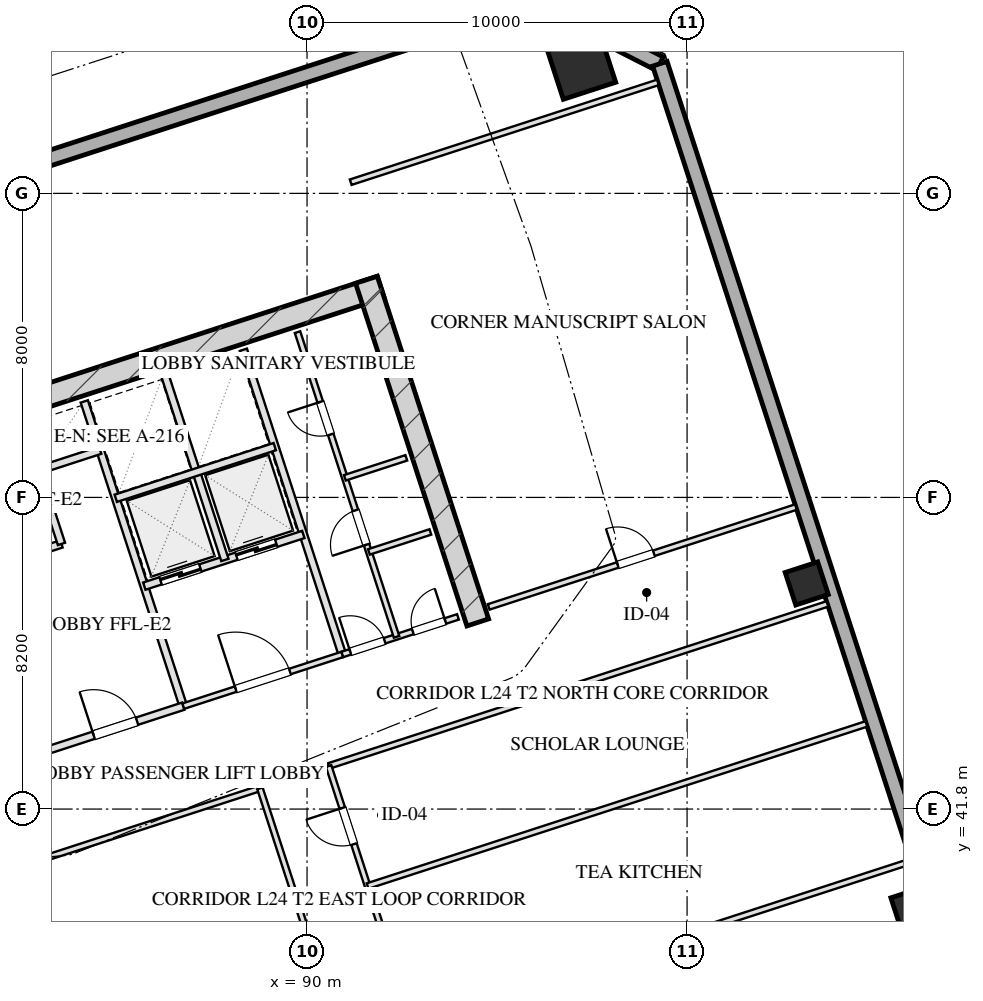
"""IFC4 building model, lengths in metres.
Left out: names, types, materials, properties, quantities, classifications, styles, units other than length and angle.
Written with IfcOpenShell. Run it as: python <this file> out.ifc"""

import sys

from ifc_helpers import new_model, si_unit, direction, frame, frame_2d, origin, origin_2d, place, context, subcontext, project, spatial, rectangle, hollow_rectangle, extrude, element, fill, save


model = new_model("IFC4")
c1 = context("Model", 3, precision=1e-05, world=origin(), true_north=direction((0.0, 1.0)))
c2 = subcontext(c1, "Body", "Model", "MODEL_VIEW")
j1 = project(units=[si_unit("LENGTHUNIT", "METRE"), si_unit("PLANEANGLEUNIT", "RADIAN")], contexts=[c1])
p1 = place(None, origin())
s1 = spatial("IfcSite", under=j1, at=p1, CompositionType="ELEMENT")
p2 = place(p1, origin())
s2 = spatial("IfcBuilding", under=s1, at=p2, CompositionType="ELEMENT")
p3 = place(p2, frame((0.0, 0.0, 96.6)))
s3 = spatial("IfcBuildingStorey", under=s2, at=p3, CompositionType="ELEMENT", Elevation=96.6)
p4 = place(p3, frame((76.344, 50.466, 0.0), z_axis=(0.0, 0.0, 1.0), x_axis=(0.951055727519, 0.309019421968, 0.0)))
e1 = element("IfcWall", 1, at=p4, inside=s3, PredefinedType="SHEAR", context=c2, shape_type="SweptSolid", body=[
    extrude(rectangle(XDim=16.4, YDim=0.6, at=frame_2d((8.2, 0.0))), origin(), (0.0, 0.0, 1.0), 3.45),
])
p5 = place(p3, frame((94.492, 46.71, 0.0), z_axis=(0.0, 0.0, 1.0), x_axis=(-0.309010370028, 0.95105866865, 0.0)))
e2 = element("IfcWall", 2, at=p5, inside=s3, PredefinedType="SHEAR", context=c2, shape_type="SweptSolid", body=[
    extrude(rectangle(XDim=9.48, YDim=0.6, at=frame_2d((4.74, 0.0))), origin(), (0.0, 0.0, 1.0), 3.45),
])
p6 = place(p3, frame((97.209, 61.388, 0.0), z_axis=(0.0, 0.0, 1.0), x_axis=(0.951056516295, 0.309016994375, 0.0)))
e3 = element("IfcColumn", 3, at=p6, inside=s3, PredefinedType="COLUMN", context=c2, shape_type="SweptSolid", body=[
    extrude(hollow_rectangle(XDim=1.45, YDim=1.45, WallThickness=0.05, at=origin_2d()), origin(), (0.0, 0.0, 1.0), 3.451),
])
for number, where, z_axis, x_axis in (
    (4, (105.93, 39.176, 0.0), (0.0, 0.0, 1.0), (0.951, 0.309, 0.0)),
    (5, (103.149, 47.736, 0.0), (0.0, 0.0, 1.0), (0.951, 0.309, 0.0)),
):
    element("IfcColumn", number, at=place(p3, frame(where, z_axis=z_axis, x_axis=x_axis)), inside=s3, PredefinedType="COLUMN", context=c2, shape_type="SweptSolid", body=[
        extrude(hollow_rectangle(XDim=0.9, YDim=0.9, WallThickness=0.032, at=origin_2d()), origin(), (0.0, 0.0, 1.0), 3.451),
    ])
p7 = place(p3, frame((68.047, 53.995, 0.0), z_axis=(0.0, 0.0, 1.0), x_axis=(0.95105505922, 0.309021478754, 0.0)))
e6 = element("IfcWall", 6, at=p7, inside=s3, PredefinedType="SOLIDWALL", context=c2, shape_type="SweptSolid", body=[
    extrude(rectangle(XDim=29.4, YDim=0.4, at=frame_2d((14.7, 0.0))), origin(), (0.0, 0.0, 1.0), 2.55),
])
p8 = place(p3, frame((96.008, 63.08, 0.0), z_axis=(0.0, 0.0, 1.0), x_axis=(0.891001999643, -0.45399937955, 0.0)))
e7 = element("IfcWall", 7, at=p8, inside=s3, PredefinedType="SOLIDWALL", context=c2, shape_type="SweptSolid", body=[
    extrude(rectangle(XDim=3.677, YDim=0.4, at=frame_2d((1.839, 0.0))), origin(), (0.0, 0.0, 1.0), 2.55),
])
p9 = place(p3, frame((99.284, 61.41, 0.0), z_axis=(0.0, 0.0, 1.0), x_axis=(0.309017542002, -0.95105633836, 0.0)))
e8 = element("IfcWall", 8, at=p9, inside=s3, PredefinedType="SOLIDWALL", context=c2, shape_type="SweptSolid", body=[
    extrude(rectangle(XDim=46.4, YDim=0.4, at=frame_2d((23.2, 0.0))), origin(), (0.0, 0.0, 1.0), 2.55),
])
p10 = place(p3, frame((86.743, 44.508, 0.0), z_axis=(0.0, 0.0, 1.0), x_axis=(-0.309016001439, 0.951056838919, 0.0)))
e9 = element("IfcWall", 9, at=p10, inside=s3, PredefinedType="PARTITIONING", context=c2, shape_type="SweptSolid", body=[
    extrude(rectangle(XDim=8.43, YDim=0.2, at=frame_2d((4.215, 0.0))), origin(), (0.0, 0.0, 1.0), 3.155),
])
p11 = place(p3, frame((83.101, 43.324, 0.0), z_axis=(0.0, 0.0, 1.0), x_axis=(0.951052804469, 0.309028417967, 0.0)))
e10 = element("IfcWall", 10, at=p11, inside=s3, PredefinedType="PARTITIONING", context=c2, shape_type="SweptSolid", body=[
    extrude(rectangle(XDim=3.83, YDim=0.2, at=frame_2d((1.915, 0.0))), origin(), (0.0, 0.0, 1.0), 3.155),
])
p12 = place(p11, frame((1.35, 0.0, 0.0)))
e11 = element("IfcOpeningElement", 11, at=p12, cuts=e10, PredefinedType="OPENING", context=c2, shape_type="SweptSolid", body=[
    extrude(rectangle(XDim=1.2, YDim=2.05, at=frame_2d((0.6, 1.025))), frame((0.0, 0.11, 0.0), z_axis=(0.0, -1.0, 0.0), x_axis=(1.0, 0.0, 0.0)), (0.0, 0.0, 1.0), 0.22),
])
p13 = place(p3, frame((81.54, 48.127, 0.0), z_axis=(0.0, 0.0, 1.0), x_axis=(0.951062257173, 0.308999325213, 0.0)))
e12 = element("IfcWall", 12, at=p13, inside=s3, PredefinedType="PARTITIONING", context=c2, shape_type="SweptSolid", body=[
    extrude(rectangle(XDim=2.1, YDim=0.2, at=frame_2d((1.05, 0.0))), origin(), (0.0, 0.0, 1.0), 3.155),
])
p14 = place(p13, frame((0.35, 0.0, 0.0)))
e13 = element("IfcOpeningElement", 13, at=p14, cuts=e12, PredefinedType="OPENING", context=c2, shape_type="SweptSolid", body=[
    extrude(rectangle(XDim=1.1, YDim=2.05, at=frame_2d((0.55, 1.025))), frame((0.0, 0.11, 0.0), z_axis=(0.0, -1.0, 0.0), x_axis=(1.0, 0.0, 0.0)), (0.0, 0.0, 1.0), 0.22),
])
p15 = place(p3, frame((83.538, 48.776, 0.0), z_axis=(0.0, 0.0, 1.0), x_axis=(-0.3089935693, 0.951064127245, 0.0)))
e14 = element("IfcWall", 14, at=p15, inside=s3, PredefinedType="PARTITIONING", context=c2, shape_type="SweptSolid", body=[
    extrude(rectangle(XDim=3.7, YDim=0.2, at=frame_2d((1.85, 0.0))), origin(), (0.0, 0.0, 1.0), 3.155),
])
p16 = place(p3, frame((82.91, 50.707, 0.0), z_axis=(0.0, 0.0, 1.0), x_axis=(0.951041328149, 0.309063734775, 0.0)))
e15 = element("IfcWall", 15, at=p16, inside=s3, PredefinedType="PARTITIONING", context=c2, shape_type="SweptSolid", body=[
    extrude(rectangle(XDim=1.73, YDim=0.2, at=frame_2d((0.865, 0.0))), origin(), (0.0, 0.0, 1.0), 3.155),
])
p17 = place(p3, frame((90.928, 45.868, 0.0), z_axis=(0.0, 0.0, 1.0), x_axis=(-0.309042196757, 0.951048327176, 0.0)))
e16 = element("IfcWall", 16, at=p17, inside=s3, PredefinedType="PARTITIONING", context=c2, shape_type="SweptSolid", body=[
    extrude(rectangle(XDim=8.43, YDim=0.2, at=frame_2d((4.215, 0.0))), origin(), (0.0, 0.0, 1.0), 3.155),
])
p18 = place(p3, frame((86.743, 44.508, 0.0), z_axis=(0.0, 0.0, 1.0), x_axis=(0.951063829732, 0.308994485023, 0.0)))
e17 = element("IfcWall", 17, at=p18, inside=s3, PredefinedType="PARTITIONING", context=c2, shape_type="SweptSolid", body=[
    extrude(rectangle(XDim=4.4, YDim=0.15, at=frame_2d((2.2, 0.0))), origin(), (0.0, 0.0, 1.0), 3.155),
])
p19 = place(p18, frame((1.45, 0.0, 0.0)))
e18 = element("IfcOpeningElement", 18, at=p19, cuts=e17, PredefinedType="OPENING", context=c2, shape_type="SweptSolid", body=[
    extrude(rectangle(XDim=1.5, YDim=2.05, at=frame_2d((0.75, 1.025))), frame((0.0, 0.085, 0.0), z_axis=(0.0, -1.0, 0.0), x_axis=(1.0, 0.0, 0.0)), (0.0, 0.0, 1.0), 0.17),
])
p20 = place(p3, frame((85.718, 47.666, 0.0), z_axis=(0.0, 0.0, 1.0), x_axis=(0.951058531764, 0.30901079133, 0.0)))
e19 = element("IfcWall", 19, at=p20, inside=s3, PredefinedType="PARTITIONING", context=c2, shape_type="SweptSolid", body=[
    extrude(rectangle(XDim=4.4, YDim=0.2, at=frame_2d((2.2, 0.0))), origin(), (0.0, 0.0, 1.0), 3.155),
])
p21 = place(p20, frame((0.45, 0.0, 0.0)))
e20 = element("IfcOpeningElement", 20, at=p21, cuts=e19, PredefinedType="OPENING", context=c2, shape_type="SweptSolid", body=[
    extrude(rectangle(XDim=1.1, YDim=2.05, at=frame_2d((0.55, 1.025))), frame((0.0, 0.11, 0.0), z_axis=(0.0, -1.0, 0.0), x_axis=(1.0, 0.0, 0.0)), (0.0, 0.0, 1.0), 0.22),
])
p22 = place(p20, frame((2.55, 0.0, 0.0)))
e21 = element("IfcOpeningElement", 21, at=p22, cuts=e19, PredefinedType="OPENING", context=c2, shape_type="SweptSolid", body=[
    extrude(rectangle(XDim=1.1, YDim=2.05, at=frame_2d((0.55, 1.025))), frame((0.0, 0.11, 0.0), z_axis=(0.0, -1.0, 0.0), x_axis=(1.0, 0.0, 0.0)), (0.0, 0.0, 1.0), 0.22),
])
p23 = place(p3, frame((87.838, 48.354, 0.0), z_axis=(0.0, 0.0, 1.0), x_axis=(-0.3090093719, 0.951058992953, 0.0)))
e22 = element("IfcWall", 22, at=p23, inside=s3, PredefinedType="PARTITIONING", context=c2, shape_type="SweptSolid", body=[
    extrude(rectangle(XDim=5.11, YDim=0.2, at=frame_2d((2.555, 0.0))), origin(), (0.0, 0.0, 1.0), 3.155),
])
p24 = place(p3, frame((84.967, 49.977, 0.0), z_axis=(0.0, 0.0, 1.0), x_axis=(0.951063829732, 0.308994485023, 0.0)))
e23 = element("IfcWall", 23, at=p24, inside=s3, PredefinedType="PARTITIONING", context=c2, shape_type="SweptSolid", body=[
    extrude(rectangle(XDim=4.4, YDim=0.2, at=frame_2d((2.2, 0.0))), origin(), (0.0, 0.0, 1.0), 3.155),
])
p25 = place(p3, frame((90.928, 45.868, 0.0), z_axis=(0.0, 0.0, 1.0), x_axis=(0.951059297078, 0.309008435874, 0.0)))
e24 = element("IfcWall", 24, at=p25, inside=s3, PredefinedType="PARTITIONING", context=c2, shape_type="SweptSolid", body=[
    extrude(rectangle(XDim=3.2, YDim=0.15, at=frame_2d((1.6, 0.0))), origin(), (0.0, 0.0, 1.0), 3.155),
])
p26 = place(p25, frame((0.22, 0.0, 0.0)))
e25 = element("IfcOpeningElement", 25, at=p26, cuts=e24, PredefinedType="OPENING", context=c2, shape_type="SweptSolid", body=[
    extrude(rectangle(XDim=0.95, YDim=2.05, at=frame_2d((0.475, 1.025))), frame((0.0, 0.085, 0.0), z_axis=(0.0, -1.0, 0.0), x_axis=(1.0, 0.0, 0.0)), (0.0, 0.0, 1.0), 0.17),
])
p27 = place(p25, frame((1.95, 0.0, 0.0)))
e26 = element("IfcOpeningElement", 26, at=p27, cuts=e24, PredefinedType="OPENING", context=c2, shape_type="SweptSolid", body=[
    extrude(rectangle(XDim=0.9, YDim=2.05, at=frame_2d((0.45, 1.025))), frame((0.0, 0.085, 0.0), z_axis=(0.0, -1.0, 0.0), x_axis=(1.0, 0.0, 0.0)), (0.0, 0.0, 1.0), 0.17),
])
p28 = place(p3, frame((92.355, 46.331, 0.0), z_axis=(0.0, 0.0, 1.0), x_axis=(-0.309007490203, 0.951059604335, 0.0)))
e27 = element("IfcWall", 27, at=p28, inside=s3, PredefinedType="PARTITIONING", context=c2, shape_type="SweptSolid", body=[
    extrude(rectangle(XDim=8.43, YDim=0.15, at=frame_2d((4.215, 0.0))), origin(), (0.0, 0.0, 1.0), 3.155),
])
p29 = place(p28, frame((2.55, 0.0, 0.0)))
e28 = element("IfcOpeningElement", 28, at=p29, cuts=e27, PredefinedType="OPENING", context=c2, shape_type="SweptSolid", body=[
    extrude(rectangle(XDim=0.95, YDim=2.05, at=frame_2d((0.475, 1.025))), frame((0.0, 0.085, 0.0), z_axis=(0.0, -1.0, 0.0), x_axis=(1.0, 0.0, 0.0)), (0.0, 0.0, 1.0), 0.17),
])
p30 = place(p28, frame((5.6, 0.0, 0.0)))
e29 = element("IfcOpeningElement", 29, at=p30, cuts=e27, PredefinedType="OPENING", context=c2, shape_type="SweptSolid", body=[
    extrude(rectangle(XDim=0.9, YDim=2.05, at=frame_2d((0.45, 1.025))), frame((0.0, 0.085, 0.0), z_axis=(0.0, -1.0, 0.0), x_axis=(1.0, 0.0, 0.0)), (0.0, 0.0, 1.0), 0.17),
])
p31 = place(p3, frame((90.995, 50.516, 0.0), z_axis=(0.0, 0.0, 1.0), x_axis=(0.951040401051, 0.309066587596, 0.0)))
e30 = element("IfcWall", 30, at=p31, inside=s3, PredefinedType="PARTITIONING", context=c2, shape_type="SweptSolid", body=[
    extrude(rectangle(XDim=1.7, YDim=0.15, at=frame_2d((0.85, 0.0))), origin(), (0.0, 0.0, 1.0), 3.155),
])
p32 = place(p3, frame((91.628, 48.566, 0.0), z_axis=(0.0, 0.0, 1.0), x_axis=(0.951054116971, 0.309024378638, 0.0)))
e31 = element("IfcWall", 31, at=p32, inside=s3, PredefinedType="PARTITIONING", context=c2, shape_type="SweptSolid", body=[
    extrude(rectangle(XDim=1.7, YDim=0.15, at=frame_2d((0.85, 0.0))), origin(), (0.0, 0.0, 1.0), 3.155),
])
p33 = place(p3, frame((91.149, 58.294, 0.0), z_axis=(0.0, 0.0, 1.0), x_axis=(0.951062770994, 0.308997743729, 0.0)))
e32 = element("IfcWall", 32, at=p33, inside=s3, PredefinedType="PARTITIONING", context=c2, shape_type="SweptSolid", body=[
    extrude(rectangle(XDim=8.5, YDim=0.15, at=frame_2d((4.25, 0.0))), origin(), (0.0, 0.0, 1.0), 3.155),
])
p34 = place(p3, frame((94.78, 47.119, 0.0), z_axis=(0.0, 0.0, 1.0), x_axis=(0.951054329824, 0.309023723562, 0.0)))
e33 = element("IfcWall", 33, at=p34, inside=s3, PredefinedType="PARTITIONING", context=c2, shape_type="SweptSolid", body=[
    extrude(rectangle(XDim=8.5, YDim=0.15, at=frame_2d((4.25, 0.0))), origin(), (0.0, 0.0, 1.0), 3.155),
])
p35 = place(p34, frame((3.57, 0.0, 0.0)))
e34 = element("IfcOpeningElement", 34, at=p35, cuts=e33, PredefinedType="OPENING", context=c2, shape_type="SweptSolid", body=[
    extrude(rectangle(XDim=1.0, YDim=2.05, at=frame_2d((0.5, 1.025))), frame((0.0, 0.085, 0.0), z_axis=(0.0, -1.0, 0.0), x_axis=(1.0, 0.0, 0.0)), (0.0, 0.0, 1.0), 0.17),
])
p36 = place(p3, frame((80.534, 39.672, 0.0), z_axis=(0.0, 0.0, 1.0), x_axis=(0.951052319652, 0.309029910015, 0.0)))
e35 = element("IfcWall", 35, at=p36, inside=s3, PredefinedType="PARTITIONING", context=c2, shape_type="SweptSolid", body=[
    extrude(rectangle(XDim=8.65, YDim=0.15, at=frame_2d((4.325, 0.0))), origin(), (0.0, 0.0, 1.0), 3.155),
])
p37 = place(p3, frame((90.567, 42.933, 0.0), z_axis=(0.0, 0.0, 1.0), x_axis=(0.951058377365, 0.309011266531, 0.0)))
e36 = element("IfcWall", 36, at=p37, inside=s3, PredefinedType="PARTITIONING", context=c2, shape_type="SweptSolid", body=[
    extrude(rectangle(XDim=13.8, YDim=0.15, at=frame_2d((6.9, 0.0))), origin(), (0.0, 0.0, 1.0), 3.155),
])
p38 = place(p3, frame((83.869, 23.26, 0.0), z_axis=(0.0, 0.0, 1.0), x_axis=(-0.309022042254, 0.951054876125, 0.0)))
e37 = element("IfcWall", 37, at=p38, inside=s3, PredefinedType="PARTITIONING", context=c2, shape_type="SweptSolid", body=[
    extrude(rectangle(XDim=16.64, YDim=0.15, at=frame_2d((8.32, 0.0))), origin(), (0.0, 0.0, 1.0), 3.155),
])
p39 = place(p38, frame((1.58, 0.0, 0.0)))
e38 = element("IfcOpeningElement", 38, at=p39, cuts=e37, PredefinedType="OPENING", context=c2, shape_type="SweptSolid", body=[
    extrude(rectangle(XDim=1.0, YDim=2.05, at=frame_2d((0.5, 1.025))), frame((0.0, 0.085, 0.0), z_axis=(0.0, -1.0, 0.0), x_axis=(1.0, 0.0, 0.0)), (0.0, 0.0, 1.0), 0.17),
])
p40 = place(p38, frame((6.08, 0.0, 0.0)))
e39 = element("IfcOpeningElement", 39, at=p40, cuts=e37, PredefinedType="OPENING", context=c2, shape_type="SweptSolid", body=[
    extrude(rectangle(XDim=1.0, YDim=2.05, at=frame_2d((0.5, 1.025))), frame((0.0, 0.085, 0.0), z_axis=(0.0, -1.0, 0.0), x_axis=(1.0, 0.0, 0.0)), (0.0, 0.0, 1.0), 0.17),
])
p41 = place(p38, frame((10.406, 0.0, 0.0)))
e40 = element("IfcOpeningElement", 40, at=p41, cuts=e37, PredefinedType="OPENING", context=c2, shape_type="SweptSolid", body=[
    extrude(rectangle(XDim=1.0, YDim=2.05, at=frame_2d((0.5, 1.025))), frame((0.0, 0.085, 0.0), z_axis=(0.0, -1.0, 0.0), x_axis=(1.0, 0.0, 0.0)), (0.0, 0.0, 1.0), 0.17),
])
p42 = place(p38, frame((14.226, 0.0, 0.0)))
e41 = element("IfcOpeningElement", 41, at=p42, cuts=e37, PredefinedType="OPENING", context=c2, shape_type="SweptSolid", body=[
    extrude(rectangle(XDim=1.0, YDim=2.05, at=frame_2d((0.5, 1.025))), frame((0.0, 0.085, 0.0), z_axis=(0.0, -1.0, 0.0), x_axis=(1.0, 0.0, 0.0)), (0.0, 0.0, 1.0), 0.17),
])
p43 = place(p3, frame((85.676, 23.847, 0.0), z_axis=(0.0, 0.0, 1.0), x_axis=(-0.309008771245, 0.951059188113, 0.0)))
e42 = element("IfcWall", 42, at=p43, inside=s3, PredefinedType="PARTITIONING", context=c2, shape_type="SweptSolid", body=[
    extrude(rectangle(XDim=16.64, YDim=0.15, at=frame_2d((8.32, 0.0))), origin(), (0.0, 0.0, 1.0), 3.155),
])
p44 = place(p43, frame((7.987, 0.0, 0.0)))
e43 = element("IfcOpeningElement", 43, at=p44, cuts=e42, PredefinedType="OPENING", context=c2, shape_type="SweptSolid", body=[
    extrude(rectangle(XDim=1.1, YDim=2.05, at=frame_2d((0.55, 1.025))), frame((0.0, 0.085, 0.0), z_axis=(0.0, -1.0, 0.0), x_axis=(1.0, 0.0, 0.0)), (0.0, 0.0, 1.0), 0.17),
])
p45 = place(p3, frame((93.903, 26.52, 0.0), z_axis=(0.0, 0.0, 1.0), x_axis=(-0.30901773025, 0.951056277195, 0.0)))
e44 = element("IfcWall", 44, at=p45, inside=s3, PredefinedType="PARTITIONING", context=c2, shape_type="SweptSolid", body=[
    extrude(rectangle(XDim=16.64, YDim=0.15, at=frame_2d((8.32, 0.0))), origin(), (0.0, 0.0, 1.0), 3.155),
])
p46 = place(p3, frame((95.709, 27.107, 0.0), z_axis=(0.0, 0.0, 1.0), x_axis=(-0.30901773025, 0.951056277195, 0.0)))
e45 = element("IfcWall", 45, at=p46, inside=s3, PredefinedType="PARTITIONING", context=c2, shape_type="SweptSolid", body=[
    extrude(rectangle(XDim=16.64, YDim=0.15, at=frame_2d((8.32, 0.0))), origin(), (0.0, 0.0, 1.0), 3.155),
])
p47 = place(p46, frame((1.164, 0.0, 0.0)))
e46 = element("IfcOpeningElement", 46, at=p47, cuts=e45, PredefinedType="OPENING", context=c2, shape_type="SweptSolid", body=[
    extrude(rectangle(XDim=1.05, YDim=2.05, at=frame_2d((0.525, 1.025))), frame((0.0, 0.085, 0.0), z_axis=(0.0, -1.0, 0.0), x_axis=(1.0, 0.0, 0.0)), (0.0, 0.0, 1.0), 0.17),
])
p48 = place(p46, frame((4.724, 0.0, 0.0)))
e47 = element("IfcOpeningElement", 47, at=p48, cuts=e45, PredefinedType="OPENING", context=c2, shape_type="SweptSolid", body=[
    extrude(rectangle(XDim=0.85, YDim=2.05, at=frame_2d((0.425, 1.025))), frame((0.0, 0.085, 0.0), z_axis=(0.0, -1.0, 0.0), x_axis=(1.0, 0.0, 0.0)), (0.0, 0.0, 1.0), 0.17),
])
p49 = place(p46, frame((7.82, 0.0, 0.0)))
e48 = element("IfcOpeningElement", 48, at=p49, cuts=e45, PredefinedType="OPENING", context=c2, shape_type="SweptSolid", body=[
    extrude(rectangle(XDim=1.0, YDim=2.05, at=frame_2d((0.5, 1.025))), frame((0.0, 0.085, 0.0), z_axis=(0.0, -1.0, 0.0), x_axis=(1.0, 0.0, 0.0)), (0.0, 0.0, 1.0), 0.17),
])
p50 = place(p46, frame((10.92, 0.0, 0.0)))
e49 = element("IfcOpeningElement", 49, at=p50, cuts=e45, PredefinedType="OPENING", context=c2, shape_type="SweptSolid", body=[
    extrude(rectangle(XDim=1.0, YDim=2.05, at=frame_2d((0.5, 1.025))), frame((0.0, 0.085, 0.0), z_axis=(0.0, -1.0, 0.0), x_axis=(1.0, 0.0, 0.0)), (0.0, 0.0, 1.0), 0.17),
])
p51 = place(p46, frame((14.48, 0.0, 0.0)))
e50 = element("IfcOpeningElement", 50, at=p51, cuts=e45, PredefinedType="OPENING", context=c2, shape_type="SweptSolid", body=[
    extrude(rectangle(XDim=1.0, YDim=2.05, at=frame_2d((0.5, 1.025))), frame((0.0, 0.085, 0.0), z_axis=(0.0, -1.0, 0.0), x_axis=(1.0, 0.0, 0.0)), (0.0, 0.0, 1.0), 0.17),
])
p52 = place(p3, frame((92.768, 36.161, 0.0), z_axis=(0.0, 0.0, 1.0), x_axis=(0.951058377365, 0.309011266531, 0.0)))
e51 = element("IfcWall", 51, at=p52, inside=s3, PredefinedType="PARTITIONING", context=c2, shape_type="SweptSolid", body=[
    extrude(rectangle(XDim=13.8, YDim=0.15, at=frame_2d((6.9, 0.0))), origin(), (0.0, 0.0, 1.0), 3.155),
])
p53 = place(p3, frame((91.594, 39.775, 0.0), z_axis=(0.0, 0.0, 1.0), x_axis=(0.951056688031, 0.309016465825, 0.0)))
e52 = element("IfcWall", 52, at=p53, inside=s3, PredefinedType="PARTITIONING", context=c2, shape_type="SweptSolid", body=[
    extrude(rectangle(XDim=13.8, YDim=0.15, at=frame_2d((6.9, 0.0))), origin(), (0.0, 0.0, 1.0), 3.155),
])
p54 = place(p12, origin())
e53 = element("IfcDoor", 53, at=p54, inside=s3, OperationType="SINGLE_SWING_LEFT", PredefinedType="DOOR", context=c2, shape_type="SweptSolid", body=[
    extrude(rectangle(XDim=1.2, YDim=2.05, at=frame_2d((0.6, 1.025))), frame((0.0, 0.025, 0.0), z_axis=(0.0, -1.0, 0.0), x_axis=(1.0, 0.0, 0.0)), (0.0, 0.0, 1.0), 0.05),
])
fill(e11, e53)
p55 = place(p19, origin())
e54 = element("IfcDoor", 54, at=p55, inside=s3, OperationType="SINGLE_SWING_LEFT", PredefinedType="DOOR", context=c2, shape_type="SweptSolid", body=[
    extrude(rectangle(XDim=1.5, YDim=2.05, at=frame_2d((0.75, 1.025))), frame((0.0, 0.025, 0.0), z_axis=(0.0, -1.0, 0.0), x_axis=(1.0, 0.0, 0.0)), (0.0, 0.0, 1.0), 0.05),
])
fill(e18, e54)
p56 = place(p21, origin())
e55 = element("IfcDoor", 55, at=p56, inside=s3, OperationType="DOUBLE_DOOR_SLIDING", PredefinedType="DOOR", context=c2, shape_type="SweptSolid", body=[
    extrude(rectangle(XDim=1.1, YDim=2.05, at=frame_2d((0.55, 1.025))), frame((0.0, 0.025, 0.0), z_axis=(0.0, -1.0, 0.0), x_axis=(1.0, 0.0, 0.0)), (0.0, 0.0, 1.0), 0.05),
])
fill(e20, e55)
p57 = place(p22, origin())
e56 = element("IfcDoor", 56, at=p57, inside=s3, OperationType="DOUBLE_DOOR_SLIDING", PredefinedType="DOOR", context=c2, shape_type="SweptSolid", body=[
    extrude(rectangle(XDim=1.1, YDim=2.05, at=frame_2d((0.55, 1.025))), frame((0.0, 0.025, 0.0), z_axis=(0.0, -1.0, 0.0), x_axis=(1.0, 0.0, 0.0)), (0.0, 0.0, 1.0), 0.05),
])
fill(e21, e56)
p58 = place(p26, origin())
e57 = element("IfcDoor", 57, at=p58, inside=s3, OperationType="SINGLE_SWING_LEFT", PredefinedType="DOOR", context=c2, shape_type="SweptSolid", body=[
    extrude(rectangle(XDim=0.95, YDim=2.05, at=frame_2d((0.475, 1.025))), frame((0.0, 0.025, 0.0), z_axis=(0.0, -1.0, 0.0), x_axis=(1.0, 0.0, 0.0)), (0.0, 0.0, 1.0), 0.05),
])
fill(e25, e57)
p59 = place(p27, origin())
e58 = element("IfcDoor", 58, at=p59, inside=s3, OperationType="SINGLE_SWING_RIGHT", PredefinedType="DOOR", context=c2, shape_type="SweptSolid", body=[
    extrude(rectangle(XDim=0.9, YDim=2.05, at=frame_2d((0.45, 1.025))), frame((0.0, 0.025, 0.0), z_axis=(0.0, -1.0, 0.0), x_axis=(1.0, 0.0, 0.0)), (0.0, 0.0, 1.0), 0.05),
])
fill(e26, e58)
p60 = place(p29, origin())
e59 = element("IfcDoor", 59, at=p60, inside=s3, OperationType="SINGLE_SWING_LEFT", PredefinedType="DOOR", context=c2, shape_type="SweptSolid", body=[
    extrude(rectangle(XDim=0.95, YDim=2.05, at=frame_2d((0.475, 1.025))), frame((0.0, 0.025, 0.0), z_axis=(0.0, -1.0, 0.0), x_axis=(1.0, 0.0, 0.0)), (0.0, 0.0, 1.0), 0.05),
])
fill(e28, e59)
p61 = place(p30, origin())
e60 = element("IfcDoor", 60, at=p61, inside=s3, OperationType="SINGLE_SWING_RIGHT", PredefinedType="DOOR", context=c2, shape_type="SweptSolid", body=[
    extrude(rectangle(XDim=0.9, YDim=2.05, at=frame_2d((0.45, 1.025))), frame((0.0, 0.025, 0.0), z_axis=(0.0, -1.0, 0.0), x_axis=(1.0, 0.0, 0.0)), (0.0, 0.0, 1.0), 0.05),
])
fill(e29, e60)
p62 = place(p35, origin())
e61 = element("IfcDoor", 61, at=p62, inside=s3, OperationType="SINGLE_SWING_LEFT", PredefinedType="DOOR", context=c2, shape_type="SweptSolid", body=[
    extrude(rectangle(XDim=1.0, YDim=2.05, at=frame_2d((0.5, 1.025))), frame((0.0, 0.025, 0.0), z_axis=(0.0, -1.0, 0.0), x_axis=(1.0, 0.0, 0.0)), (0.0, 0.0, 1.0), 0.05),
])
fill(e34, e61)
p63 = place(p51, origin())
e62 = element("IfcDoor", 62, at=p63, inside=s3, OperationType="SINGLE_SWING_RIGHT", PredefinedType="DOOR", context=c2, shape_type="SweptSolid", body=[
    extrude(rectangle(XDim=1.0, YDim=2.05, at=frame_2d((0.5, 1.025))), frame((0.0, 0.025, 0.0), z_axis=(0.0, -1.0, 0.0), x_axis=(1.0, 0.0, 0.0)), (0.0, 0.0, 1.0), 0.05),
])
fill(e50, e62)
save(model, sys.argv[1])
